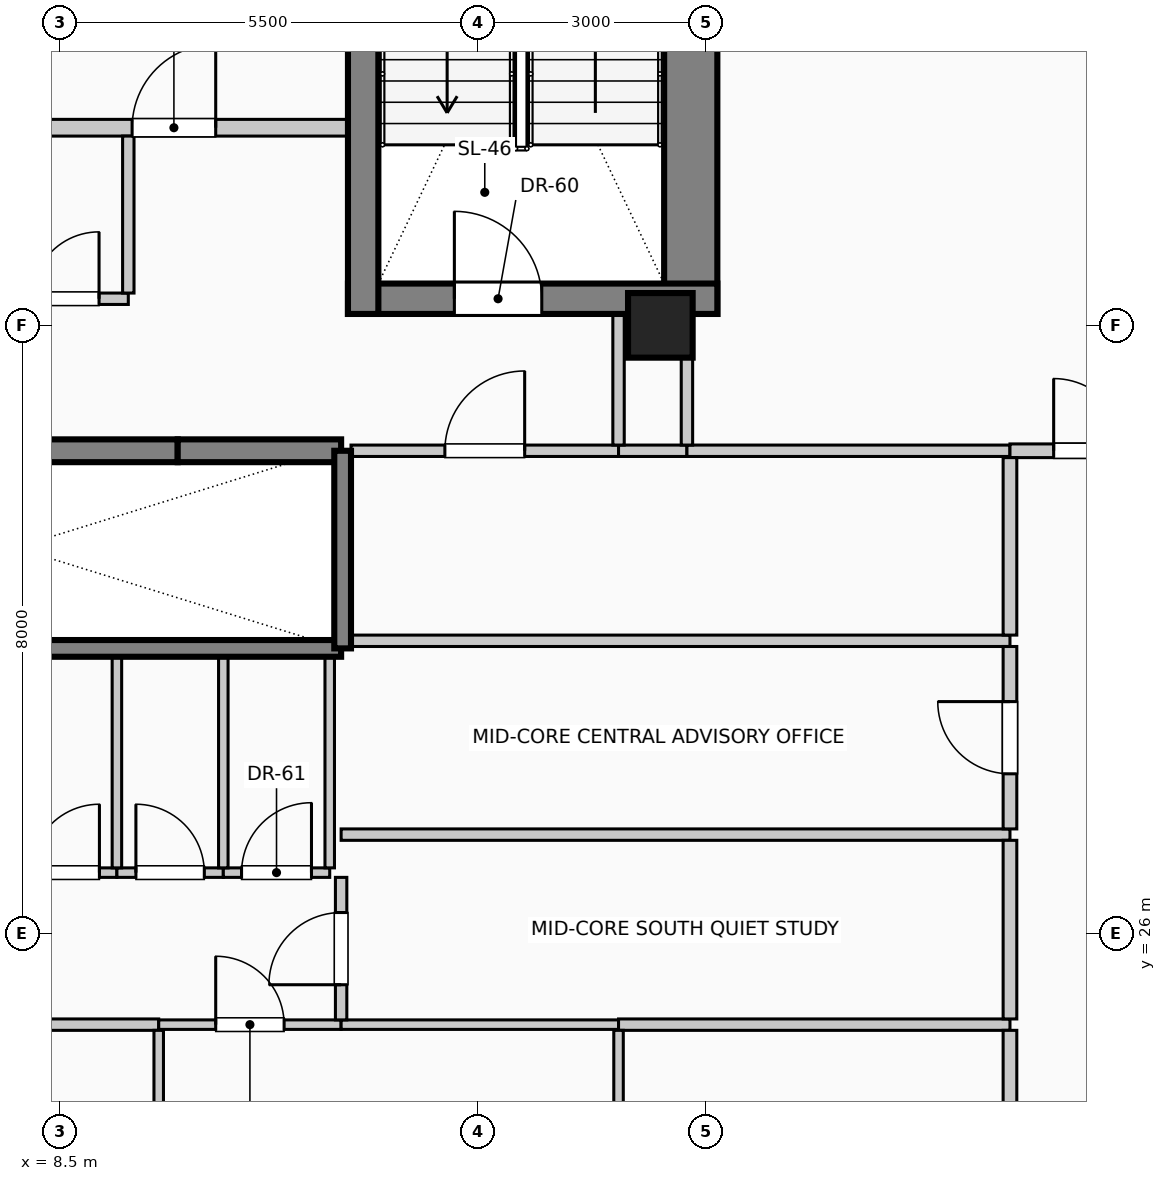
"""IFC4 building model, lengths in metres.
Left out: names, types, materials, properties, quantities, classifications, styles, units other than length and angle.
Written with IfcOpenShell. Run it as: python <this file> out.ifc"""

import sys

from ifc_helpers import new_model, si_unit, direction, frame, frame_2d, origin, origin_2d, place, context, subcontext, project, spatial, rectangle, circle, extrude, element, fill, save


model = new_model("IFC4")
c1 = context("Model", 3, precision=1e-05, world=origin(), true_north=direction((0.0, 1.0)))
c2 = subcontext(c1, "Body", "Model", "MODEL_VIEW")
j1 = project(units=[si_unit("LENGTHUNIT", "METRE"), si_unit("PLANEANGLEUNIT", "RADIAN")], contexts=[c1])
p1 = place(None, origin())
s1 = spatial("IfcSite", under=j1, at=p1, CompositionType="ELEMENT")
p2 = place(p1, origin())
s2 = spatial("IfcBuilding", under=s1, at=p2, CompositionType="ELEMENT")
p3 = place(p2, frame((0.0, 0.0, 218.6)))
s3 = spatial("IfcBuildingStorey", under=s2, at=p3, CompositionType="ELEMENT", Elevation=218.6)
p4 = place(p3, frame((16.8, 34.15, 0.0), z_axis=(0.0, 0.0, 1.0), x_axis=(0.0, 1.0, 0.0)))
e1 = element("IfcWall", 1, at=p4, inside=s3, PredefinedType="SHEAR", context=c2, shape_type="SweptSolid", body=[
    extrude(rectangle(XDim=8.98, YDim=0.7, at=frame_2d((4.49, 0.0))), origin(), (0.0, 0.0, 1.0), 4.0),
])
p5 = place(p3, frame((12.29, 34.35, 0.0), z_axis=(0.0, 0.0, 1.0), x_axis=(1.0, 0.0, 0.0)))
e2 = element("IfcWall", 2, at=p5, inside=s3, PredefinedType="SHEAR", context=c2, shape_type="SweptSolid", body=[
    extrude(rectangle(XDim=4.86, YDim=0.4, at=frame_2d((2.43, 0.0))), origin(), (0.0, 0.0, 1.0), 4.0),
])
p6 = place(p5, frame((1.4, 0.0, 0.0)))
e3 = element("IfcOpeningElement", 3, at=p6, cuts=e2, PredefinedType="OPENING", context=c2, shape_type="SweptSolid", body=[
    extrude(rectangle(XDim=1.15, YDim=2.2, at=frame_2d((0.575, 1.1))), frame((0.0, 0.21, 0.0), z_axis=(0.0, -1.0, 0.0), x_axis=(1.0, 0.0, 0.0)), (0.0, 0.0, 1.0), 0.42),
])
p7 = place(p3, frame((12.49, 34.15, 0.0), z_axis=(0.0, 0.0, 1.0), x_axis=(0.0, 1.0, 0.0)))
e4 = element("IfcWall", 4, at=p7, inside=s3, PredefinedType="SHEAR", context=c2, shape_type="SweptSolid", body=[
    extrude(rectangle(XDim=8.98, YDim=0.4, at=frame_2d((4.49, 0.0))), origin(), (0.0, 0.0, 1.0), 4.0),
])
p8 = place(p3, frame((16.4, 34.0, 0.0), z_axis=(0.0, 0.0, 1.0), x_axis=(1.0, 0.0, 0.0)))
e5 = element("IfcColumn", 5, at=p8, inside=s3, PredefinedType="COLUMN", context=c2, shape_type="SweptSolid", body=[
    extrude(circle(Radius=0.425, at=origin_2d()), origin(), (0.0, 0.0, 1.0), 4.0),
])
p9 = place(p3, frame((7.85, 32.35, 0.0), z_axis=(0.0, 0.0, 1.0), x_axis=(1.0, 0.0, 0.0)))
e6 = element("IfcWall", 6, at=p9, inside=s3, PredefinedType="SOLIDWALL", context=c2, shape_type="SweptSolid", body=[
    extrude(rectangle(XDim=2.2, YDim=0.3, at=frame_2d((1.1, 0.0))), origin(), (0.0, 0.0, 1.0), 4.0),
])
p10 = place(p3, frame((10.05, 32.35, 0.0), z_axis=(0.0, 0.0, 1.0), x_axis=(1.0, 0.0, 0.0)))
e7 = element("IfcWall", 7, at=p10, inside=s3, PredefinedType="SOLIDWALL", context=c2, shape_type="SweptSolid", body=[
    extrude(rectangle(XDim=2.15, YDim=0.3, at=frame_2d((1.075, 0.0))), origin(), (0.0, 0.0, 1.0), 4.0),
])
p11 = place(p3, frame((3.55, 29.75, 0.0), z_axis=(0.0, 0.0, 1.0), x_axis=(1.0, 0.0, 0.0)))
e8 = element("IfcWall", 8, at=p11, inside=s3, PredefinedType="SOLIDWALL", context=c2, shape_type="SweptSolid", body=[
    extrude(rectangle(XDim=8.65, YDim=0.22, at=frame_2d((4.325, 0.0))), origin(), (0.0, 0.0, 1.0), 4.0),
])
p12 = place(p3, frame((12.22, 29.75, 0.0), z_axis=(0.0, 0.0, 1.0), x_axis=(0.0, 1.0, 0.0)))
e9 = element("IfcWall", 9, at=p12, inside=s3, PredefinedType="SOLIDWALL", context=c2, shape_type="SweptSolid", body=[
    extrude(rectangle(XDim=2.6, YDim=0.22, at=frame_2d((1.3, 0.0))), origin(), (0.0, 0.0, 1.0), 4.0),
])
p13 = place(p3, frame((7.51, 36.6, 0.0), z_axis=(0.0, 0.0, 1.0), x_axis=(1.0, 0.0, 0.0)))
e10 = element("IfcWall", 10, at=p13, inside=s3, PredefinedType="PARTITIONING", context=c2, shape_type="SweptSolid", body=[
    extrude(rectangle(XDim=4.98, YDim=0.22, at=frame_2d((2.49, 0.0))), origin(), (0.0, 0.0, 1.0), 3.75),
])
p14 = place(p13, frame((1.94, 0.0, 0.0)))
e11 = element("IfcOpeningElement", 11, at=p14, cuts=e10, PredefinedType="OPENING", context=c2, shape_type="SweptSolid", body=[
    extrude(rectangle(XDim=1.1, YDim=2.2, at=frame_2d((0.55, 1.1))), frame((0.0, 0.12, 0.0), z_axis=(0.0, -1.0, 0.0), x_axis=(1.0, 0.0, 0.0)), (0.0, 0.0, 1.0), 0.24),
])
p15 = place(p3, frame((3.55, 24.8, 0.0), z_axis=(0.0, 0.0, 1.0), x_axis=(1.0, 0.0, 0.0)))
e12 = element("IfcWall", 12, at=p15, inside=s3, PredefinedType="PARTITIONING", context=c2, shape_type="SweptSolid", body=[
    extrude(rectangle(XDim=6.25, YDim=0.15, at=frame_2d((3.125, 0.0))), origin(), (0.0, 0.0, 1.0), 3.75),
])
p16 = place(p15, frame((2.65, 0.0, 0.0)))
e13 = element("IfcOpeningElement", 13, at=p16, cuts=e12, PredefinedType="OPENING", context=c2, shape_type="SweptSolid", body=[
    extrude(rectangle(XDim=0.95, YDim=2.15, at=frame_2d((0.475, 1.075))), frame((0.0, 0.085, 0.0), z_axis=(0.0, -1.0, 0.0), x_axis=(1.0, 0.0, 0.0)), (0.0, 0.0, 1.0), 0.17),
])
p17 = place(p3, frame((9.8, 24.8, 0.0), z_axis=(0.0, 0.0, 1.0), x_axis=(1.0, 0.0, 0.0)))
e14 = element("IfcWall", 14, at=p17, inside=s3, PredefinedType="PARTITIONING", context=c2, shape_type="SweptSolid", body=[
    extrude(rectangle(XDim=2.4, YDim=0.125, at=frame_2d((1.2, 0.0))), origin(), (0.0, 0.0, 1.0), 3.75),
])
p18 = place(p17, frame((0.75, 0.0, 0.0)))
e15 = element("IfcOpeningElement", 15, at=p18, cuts=e14, PredefinedType="OPENING", context=c2, shape_type="SweptSolid", body=[
    extrude(rectangle(XDim=0.9, YDim=2.1, at=frame_2d((0.45, 1.05))), frame((0.0, 0.073, 0.0), z_axis=(0.0, -1.0, 0.0), x_axis=(1.0, 0.0, 0.0)), (0.0, 0.0, 1.0), 0.145),
])
p19 = place(p3, frame((12.2, 24.8, 0.0), z_axis=(0.0, 0.0, 1.0), x_axis=(1.0, 0.0, 0.0)))
e16 = element("IfcWall", 16, at=p19, inside=s3, PredefinedType="PARTITIONING", context=c2, shape_type="SweptSolid", body=[
    extrude(rectangle(XDim=3.65, YDim=0.125, at=frame_2d((1.825, 0.0))), origin(), (0.0, 0.0, 1.0), 3.75),
])
p20 = place(p3, frame((15.85, 24.8, 0.0), z_axis=(0.0, 0.0, 1.0), x_axis=(1.0, 0.0, 0.0)))
e17 = element("IfcWall", 17, at=p20, inside=s3, PredefinedType="PARTITIONING", context=c2, shape_type="SweptSolid", body=[
    extrude(rectangle(XDim=5.15, YDim=0.15, at=frame_2d((2.575, 0.0))), origin(), (0.0, 0.0, 1.0), 3.75),
])
p21 = place(p3, frame((7.89, 26.8, 0.0), z_axis=(0.0, 0.0, 1.0), x_axis=(1.0, 0.0, 0.0)))
e18 = element("IfcWall", 18, at=p21, inside=s3, PredefinedType="PARTITIONING", context=c2, shape_type="SweptSolid", body=[
    extrude(rectangle(XDim=1.36, YDim=0.125, at=frame_2d((0.68, 0.0))), origin(), (0.0, 0.0, 1.0), 3.75),
])
p22 = place(p21, frame((0.23, 0.0, 0.0)))
e19 = element("IfcOpeningElement", 19, at=p22, cuts=e18, PredefinedType="OPENING", context=c2, shape_type="SweptSolid", body=[
    extrude(rectangle(XDim=0.9, YDim=2.1, at=frame_2d((0.45, 1.05))), frame((0.0, 0.073, 0.0), z_axis=(0.0, -1.0, 0.0), x_axis=(1.0, 0.0, 0.0)), (0.0, 0.0, 1.0), 0.145),
])
p23 = place(p3, frame((9.25, 26.8, 0.0), z_axis=(0.0, 0.0, 1.0), x_axis=(1.0, 0.0, 0.0)))
e20 = element("IfcWall", 20, at=p23, inside=s3, PredefinedType="PARTITIONING", context=c2, shape_type="SweptSolid", body=[
    extrude(rectangle(XDim=1.4, YDim=0.125, at=frame_2d((0.7, 0.0))), origin(), (0.0, 0.0, 1.0), 3.75),
])
p24 = place(p23, frame((0.25, 0.0, 0.0)))
e21 = element("IfcOpeningElement", 21, at=p24, cuts=e20, PredefinedType="OPENING", context=c2, shape_type="SweptSolid", body=[
    extrude(rectangle(XDim=0.9, YDim=2.1, at=frame_2d((0.45, 1.05))), frame((0.0, 0.073, 0.0), z_axis=(0.0, -1.0, 0.0), x_axis=(1.0, 0.0, 0.0)), (0.0, 0.0, 1.0), 0.145),
])
p25 = place(p3, frame((10.65, 26.8, 0.0), z_axis=(0.0, 0.0, 1.0), x_axis=(1.0, 0.0, 0.0)))
e22 = element("IfcWall", 22, at=p25, inside=s3, PredefinedType="PARTITIONING", context=c2, shape_type="SweptSolid", body=[
    extrude(rectangle(XDim=1.4, YDim=0.125, at=frame_2d((0.7, 0.0))), origin(), (0.0, 0.0, 1.0), 3.75),
])
p26 = place(p25, frame((0.24, 0.0, 0.0)))
e23 = element("IfcOpeningElement", 23, at=p26, cuts=e22, PredefinedType="OPENING", context=c2, shape_type="SweptSolid", body=[
    extrude(rectangle(XDim=0.92, YDim=2.1, at=frame_2d((0.46, 1.05))), frame((0.0, 0.073, 0.0), z_axis=(0.0, -1.0, 0.0), x_axis=(1.0, 0.0, 0.0)), (0.0, 0.0, 1.0), 0.145),
])
p27 = place(p3, frame((12.2, 27.3, 0.0), z_axis=(0.0, 0.0, 1.0), x_axis=(1.0, 0.0, 0.0)))
e24 = element("IfcWall", 24, at=p27, inside=s3, PredefinedType="PARTITIONING", context=c2, shape_type="SweptSolid", body=[
    extrude(rectangle(XDim=8.8, YDim=0.15, at=frame_2d((4.4, 0.0))), origin(), (0.0, 0.0, 1.0), 3.75),
])
p28 = place(p3, frame((12.33, 29.85, 0.0), z_axis=(0.0, 0.0, 1.0), x_axis=(1.0, 0.0, 0.0)))
e25 = element("IfcWall", 25, at=p28, inside=s3, PredefinedType="PARTITIONING", context=c2, shape_type="SweptSolid", body=[
    extrude(rectangle(XDim=8.67, YDim=0.15, at=frame_2d((4.335, 0.0))), origin(), (0.0, 0.0, 1.0), 3.75),
])
p29 = place(p3, frame((12.33, 32.35, 0.0), z_axis=(0.0, 0.0, 1.0), x_axis=(1.0, 0.0, 0.0)))
e26 = element("IfcWall", 26, at=p29, inside=s3, PredefinedType="PARTITIONING", context=c2, shape_type="SweptSolid", body=[
    extrude(rectangle(XDim=3.52, YDim=0.15, at=frame_2d((1.76, 0.0))), origin(), (0.0, 0.0, 1.0), 3.75),
])
p30 = place(p29, frame((1.235, 0.0, 0.0)))
e27 = element("IfcOpeningElement", 27, at=p30, cuts=e26, PredefinedType="OPENING", context=c2, shape_type="SweptSolid", body=[
    extrude(rectangle(XDim=1.05, YDim=2.15, at=frame_2d((0.525, 1.075))), frame((0.0, 0.085, 0.0), z_axis=(0.0, -1.0, 0.0), x_axis=(1.0, 0.0, 0.0)), (0.0, 0.0, 1.0), 0.17),
])
p31 = place(p3, frame((15.85, 32.35, 0.0), z_axis=(0.0, 0.0, 1.0), x_axis=(1.0, 0.0, 0.0)))
e28 = element("IfcWall", 28, at=p31, inside=s3, PredefinedType="PARTITIONING", context=c2, shape_type="SweptSolid", body=[
    extrude(rectangle(XDim=0.9, YDim=0.15, at=frame_2d((0.45, 0.0))), origin(), (0.0, 0.0, 1.0), 3.75),
])
p32 = place(p3, frame((16.75, 32.35, 0.0), z_axis=(0.0, 0.0, 1.0), x_axis=(1.0, 0.0, 0.0)))
e29 = element("IfcWall", 29, at=p32, inside=s3, PredefinedType="PARTITIONING", context=c2, shape_type="SweptSolid", body=[
    extrude(rectangle(XDim=4.25, YDim=0.15, at=frame_2d((2.125, 0.0))), origin(), (0.0, 0.0, 1.0), 3.75),
])
p33 = place(p3, frame((21.0, 32.35, 0.0), z_axis=(0.0, 0.0, 1.0), x_axis=(1.0, 0.0, 0.0)))
e30 = element("IfcWall", 30, at=p33, inside=s3, PredefinedType="PARTITIONING", context=c2, shape_type="SweptSolid", body=[
    extrude(rectangle(XDim=2.1, YDim=0.18, at=frame_2d((1.05, 0.0))), origin(), (0.0, 0.0, 1.0), 3.75),
])
p34 = place(p33, frame((0.575, 0.0, 0.0)))
e31 = element("IfcOpeningElement", 31, at=p34, cuts=e30, PredefinedType="OPENING", context=c2, shape_type="SweptSolid", body=[
    extrude(rectangle(XDim=0.95, YDim=2.15, at=frame_2d((0.475, 1.075))), frame((0.0, 0.1, 0.0), z_axis=(0.0, -1.0, 0.0), x_axis=(1.0, 0.0, 0.0)), (0.0, 0.0, 1.0), 0.2),
])
p35 = place(p3, frame((7.75, 34.35, 0.0), z_axis=(0.0, 0.0, 1.0), x_axis=(1.0, 0.0, 0.0)))
e32 = element("IfcWall", 32, at=p35, inside=s3, PredefinedType="PARTITIONING", context=c2, shape_type="SweptSolid", body=[
    extrude(rectangle(XDim=1.65, YDim=0.15, at=frame_2d((0.825, 0.0))), origin(), (0.0, 0.0, 1.0), 3.75),
])
p36 = place(p35, frame((0.385, 0.0, 0.0)))
e33 = element("IfcOpeningElement", 33, at=p36, cuts=e32, PredefinedType="OPENING", context=c2, shape_type="SweptSolid", body=[
    extrude(rectangle(XDim=0.88, YDim=2.1, at=frame_2d((0.44, 1.05))), frame((0.0, 0.085, 0.0), z_axis=(0.0, -1.0, 0.0), x_axis=(1.0, 0.0, 0.0)), (0.0, 0.0, 1.0), 0.17),
])
p37 = place(p3, frame((9.25, 26.863, 0.0), z_axis=(0.0, 0.0, 1.0), x_axis=(0.0, 1.0, 0.0)))
e34 = element("IfcWall", 34, at=p37, inside=s3, PredefinedType="PARTITIONING", context=c2, shape_type="SweptSolid", body=[
    extrude(rectangle(XDim=2.777, YDim=0.125, at=frame_2d((1.389, 0.0))), origin(), (0.0, 0.0, 1.0), 3.75),
])
p38 = place(p3, frame((9.4, 34.425, 0.0), z_axis=(0.0, 0.0, 1.0), x_axis=(0.0, 1.0, 0.0)))
e35 = element("IfcWall", 35, at=p38, inside=s3, PredefinedType="PARTITIONING", context=c2, shape_type="SweptSolid", body=[
    extrude(rectangle(XDim=2.065, YDim=0.15, at=frame_2d((1.032, 0.0))), origin(), (0.0, 0.0, 1.0), 3.75),
])
p39 = place(p3, frame((9.8, 17.375, 0.0), z_axis=(0.0, 0.0, 1.0), x_axis=(0.0, 1.0, 0.0)))
e36 = element("IfcWall", 36, at=p39, inside=s3, PredefinedType="PARTITIONING", context=c2, shape_type="SweptSolid", body=[
    extrude(rectangle(XDim=7.35, YDim=0.125, at=frame_2d((3.675, 0.0))), origin(), (0.0, 0.0, 1.0), 3.75),
])
for number, where, z_axis, x_axis in (
    (37, (10.65, 26.863, 0.0), (0.0, 0.0, 1.0), (0.0, 1.0, 0.0)),
    (38, (12.05, 26.863, 0.0), (0.0, 0.0, 1.0), (0.0, 1.0, 0.0)),
):
    element("IfcWall", number, at=place(p3, frame(where, z_axis=z_axis, x_axis=x_axis)), inside=s3, PredefinedType="PARTITIONING", context=c2, shape_type="SweptSolid", body=[
        extrude(rectangle(XDim=2.777, YDim=0.125, at=frame_2d((1.389, 0.0))), origin(), (0.0, 0.0, 1.0), 3.75),
    ])
p40 = place(p3, frame((12.2, 24.863, 0.0), z_axis=(0.0, 0.0, 1.0), x_axis=(0.0, 1.0, 0.0)))
e39 = element("IfcWall", 39, at=p40, inside=s3, PredefinedType="PARTITIONING", context=c2, shape_type="SweptSolid", body=[
    extrude(rectangle(XDim=1.875, YDim=0.15, at=frame_2d((0.938, 0.0))), origin(), (0.0, 0.0, 1.0), 3.75),
])
p41 = place(p40, frame((0.462, 0.0, 0.0)))
e40 = element("IfcOpeningElement", 40, at=p41, cuts=e39, PredefinedType="OPENING", context=c2, shape_type="SweptSolid", body=[
    extrude(rectangle(XDim=0.95, YDim=2.15, at=frame_2d((0.475, 1.075))), frame((0.0, 0.085, 0.0), z_axis=(0.0, -1.0, 0.0), x_axis=(1.0, 0.0, 0.0)), (0.0, 0.0, 1.0), 0.17),
])
p42 = place(p3, frame((15.85, 17.363, 0.0), z_axis=(0.0, 0.0, 1.0), x_axis=(0.0, 1.0, 0.0)))
e41 = element("IfcWall", 41, at=p42, inside=s3, PredefinedType="PARTITIONING", context=c2, shape_type="SweptSolid", body=[
    extrude(rectangle(XDim=7.363, YDim=0.125, at=frame_2d((3.681, 0.0))), origin(), (0.0, 0.0, 1.0), 3.75),
])
p43 = place(p3, frame((15.85, 32.425, 0.0), z_axis=(0.0, 0.0, 1.0), x_axis=(0.0, 1.0, 0.0)))
e42 = element("IfcWall", 42, at=p43, inside=s3, PredefinedType="PARTITIONING", context=c2, shape_type="SweptSolid", body=[
    extrude(rectangle(XDim=1.725, YDim=0.15, at=frame_2d((0.862, 0.0))), origin(), (0.0, 0.0, 1.0), 3.75),
])
p44 = place(p3, frame((16.75, 32.425, 0.0), z_axis=(0.0, 0.0, 1.0), x_axis=(0.0, 1.0, 0.0)))
e43 = element("IfcWall", 43, at=p44, inside=s3, PredefinedType="PARTITIONING", context=c2, shape_type="SweptSolid", body=[
    extrude(rectangle(XDim=1.15, YDim=0.15, at=frame_2d((0.575, 0.0))), origin(), (0.0, 0.0, 1.0), 3.75),
])
p45 = place(p3, frame((21.0, 16.39, 0.0), z_axis=(0.0, 0.0, 1.0), x_axis=(0.0, 1.0, 0.0)))
e44 = element("IfcWall", 44, at=p45, inside=s3, PredefinedType="PARTITIONING", context=c2, shape_type="SweptSolid", body=[
    extrude(rectangle(XDim=8.335, YDim=0.18, at=frame_2d((4.167, 0.0))), origin(), (0.0, 0.0, 1.0), 3.75),
])
p46 = place(p3, frame((21.0, 24.875, 0.0), z_axis=(0.0, 0.0, 1.0), x_axis=(0.0, 1.0, 0.0)))
e45 = element("IfcWall", 45, at=p46, inside=s3, PredefinedType="PARTITIONING", context=c2, shape_type="SweptSolid", body=[
    extrude(rectangle(XDim=2.35, YDim=0.18, at=frame_2d((1.175, 0.0))), origin(), (0.0, 0.0, 1.0), 3.75),
])
p47 = place(p3, frame((21.0, 27.375, 0.0), z_axis=(0.0, 0.0, 1.0), x_axis=(0.0, 1.0, 0.0)))
e46 = element("IfcWall", 46, at=p47, inside=s3, PredefinedType="PARTITIONING", context=c2, shape_type="SweptSolid", body=[
    extrude(rectangle(XDim=2.4, YDim=0.18, at=frame_2d((1.2, 0.0))), origin(), (0.0, 0.0, 1.0), 3.75),
])
p48 = place(p47, frame((0.725, 0.0, 0.0)))
e47 = element("IfcOpeningElement", 47, at=p48, cuts=e46, PredefinedType="OPENING", context=c2, shape_type="SweptSolid", body=[
    extrude(rectangle(XDim=0.95, YDim=2.15, at=frame_2d((0.475, 1.075))), frame((0.0, 0.1, 0.0), z_axis=(0.0, -1.0, 0.0), x_axis=(1.0, 0.0, 0.0)), (0.0, 0.0, 1.0), 0.2),
])
p49 = place(p3, frame((21.0, 29.925, 0.0), z_axis=(0.0, 0.0, 1.0), x_axis=(0.0, 1.0, 0.0)))
e48 = element("IfcWall", 48, at=p49, inside=s3, PredefinedType="PARTITIONING", context=c2, shape_type="SweptSolid", body=[
    extrude(rectangle(XDim=2.335, YDim=0.18, at=frame_2d((1.167, 0.0))), origin(), (0.0, 0.0, 1.0), 3.75),
])
p50 = place(p6, origin())
e49 = element("IfcDoor", 49, at=p50, inside=s3, OperationType="SINGLE_SWING_LEFT", PredefinedType="DOOR", context=c2, shape_type="SweptSolid", body=[
    extrude(rectangle(XDim=1.15, YDim=2.2, at=frame_2d((0.575, 1.1))), frame((0.0, 0.025, 0.0), z_axis=(0.0, -1.0, 0.0), x_axis=(1.0, 0.0, 0.0)), (0.0, 0.0, 1.0), 0.05),
])
fill(e3, e49)
p51 = place(p14, origin())
e50 = element("IfcDoor", 50, at=p51, inside=s3, OperationType="SINGLE_SWING_RIGHT", PredefinedType="DOOR", context=c2, shape_type="SweptSolid", body=[
    extrude(rectangle(XDim=1.1, YDim=2.2, at=frame_2d((0.55, 1.1))), frame((0.0, 0.025, 0.0), z_axis=(0.0, -1.0, 0.0), x_axis=(1.0, 0.0, 0.0)), (0.0, 0.0, 1.0), 0.05),
])
fill(e11, e50)
p52 = place(p18, origin())
e51 = element("IfcDoor", 51, at=p52, inside=s3, OperationType="SINGLE_SWING_LEFT", PredefinedType="DOOR", context=c2, shape_type="SweptSolid", body=[
    extrude(rectangle(XDim=0.9, YDim=2.1, at=frame_2d((0.45, 1.05))), frame((0.0, 0.025, 0.0), z_axis=(0.0, -1.0, 0.0), x_axis=(1.0, 0.0, 0.0)), (0.0, 0.0, 1.0), 0.05),
])
fill(e15, e51)
p53 = place(p22, origin())
e52 = element("IfcDoor", 52, at=p53, inside=s3, OperationType="SINGLE_SWING_RIGHT", PredefinedType="DOOR", context=c2, shape_type="SweptSolid", body=[
    extrude(rectangle(XDim=0.9, YDim=2.1, at=frame_2d((0.45, 1.05))), frame((0.0, 0.025, 0.0), z_axis=(0.0, -1.0, 0.0), x_axis=(1.0, 0.0, 0.0)), (0.0, 0.0, 1.0), 0.05),
])
fill(e19, e52)
p54 = place(p24, origin())
e53 = element("IfcDoor", 53, at=p54, inside=s3, OperationType="SINGLE_SWING_LEFT", PredefinedType="DOOR", context=c2, shape_type="SweptSolid", body=[
    extrude(rectangle(XDim=0.9, YDim=2.1, at=frame_2d((0.45, 1.05))), frame((0.0, 0.025, 0.0), z_axis=(0.0, -1.0, 0.0), x_axis=(1.0, 0.0, 0.0)), (0.0, 0.0, 1.0), 0.05),
])
fill(e21, e53)
p55 = place(p26, origin())
e54 = element("IfcDoor", 54, at=p55, inside=s3, OperationType="SINGLE_SWING_RIGHT", PredefinedType="DOOR", context=c2, shape_type="SweptSolid", body=[
    extrude(rectangle(XDim=0.92, YDim=2.1, at=frame_2d((0.46, 1.05))), frame((0.0, 0.025, 0.0), z_axis=(0.0, -1.0, 0.0), x_axis=(1.0, 0.0, 0.0)), (0.0, 0.0, 1.0), 0.05),
])
fill(e23, e54)
p56 = place(p30, origin())
e55 = element("IfcDoor", 55, at=p56, inside=s3, OperationType="SINGLE_SWING_RIGHT", PredefinedType="DOOR", context=c2, shape_type="SweptSolid", body=[
    extrude(rectangle(XDim=1.05, YDim=2.15, at=frame_2d((0.525, 1.075))), frame((0.0, 0.025, 0.0), z_axis=(0.0, -1.0, 0.0), x_axis=(1.0, 0.0, 0.0)), (0.0, 0.0, 1.0), 0.05),
])
fill(e27, e55)
p57 = place(p34, origin())
e56 = element("IfcDoor", 56, at=p57, inside=s3, OperationType="SINGLE_SWING_LEFT", PredefinedType="DOOR", context=c2, shape_type="SweptSolid", body=[
    extrude(rectangle(XDim=0.95, YDim=2.15, at=frame_2d((0.475, 1.075))), frame((0.0, 0.025, 0.0), z_axis=(0.0, -1.0, 0.0), x_axis=(1.0, 0.0, 0.0)), (0.0, 0.0, 1.0), 0.05),
])
fill(e31, e56)
p58 = place(p36, origin())
e57 = element("IfcDoor", 57, at=p58, inside=s3, OperationType="SINGLE_SWING_RIGHT", PredefinedType="DOOR", context=c2, shape_type="SweptSolid", body=[
    extrude(rectangle(XDim=0.88, YDim=2.1, at=frame_2d((0.44, 1.05))), frame((0.0, 0.025, 0.0), z_axis=(0.0, -1.0, 0.0), x_axis=(1.0, 0.0, 0.0)), (0.0, 0.0, 1.0), 0.05),
])
fill(e33, e57)
p59 = place(p41, origin())
e58 = element("IfcDoor", 58, at=p59, inside=s3, OperationType="SINGLE_SWING_LEFT", PredefinedType="DOOR", context=c2, shape_type="SweptSolid", body=[
    extrude(rectangle(XDim=0.95, YDim=2.15, at=frame_2d((0.475, 1.075))), frame((0.0, 0.025, 0.0), z_axis=(0.0, -1.0, 0.0), x_axis=(1.0, 0.0, 0.0)), (0.0, 0.0, 1.0), 0.05),
])
fill(e40, e58)
p60 = place(p48, origin())
e59 = element("IfcDoor", 59, at=p60, inside=s3, OperationType="SINGLE_SWING_RIGHT", PredefinedType="DOOR", context=c2, shape_type="SweptSolid", body=[
    extrude(rectangle(XDim=0.95, YDim=2.15, at=frame_2d((0.475, 1.075))), frame((0.0, 0.025, 0.0), z_axis=(0.0, -1.0, 0.0), x_axis=(1.0, 0.0, 0.0)), (0.0, 0.0, 1.0), 0.05),
])
fill(e47, e59)
save(model, sys.argv[1])
